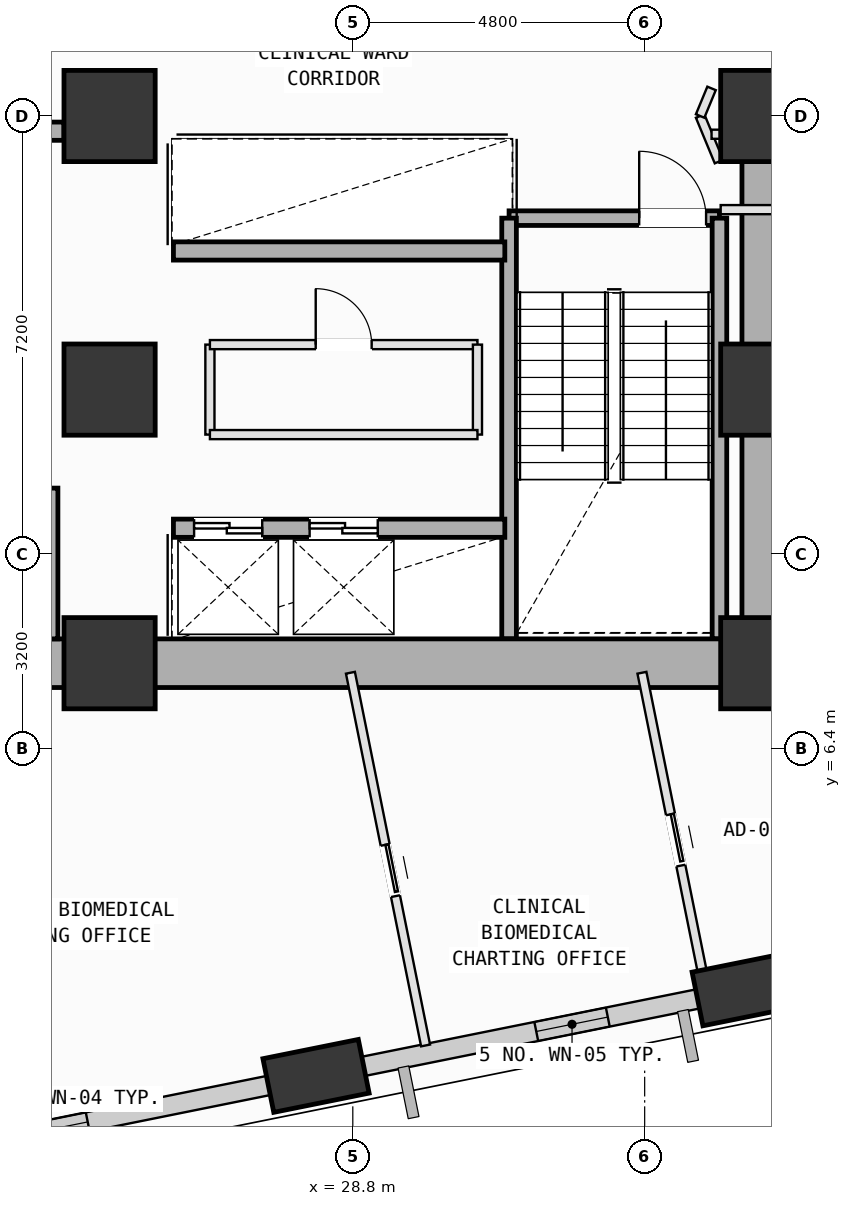
"""IFC4 building model, lengths in metres.
Left out: names, types, materials, properties, quantities, classifications, styles, units other than length and angle.
Written with IfcOpenShell. Run it as: python <this file> out.ifc"""

import sys

from ifc_helpers import new_model, si_unit, direction, frame, frame_2d, origin, origin_2d, place, context, subcontext, project, spatial, rectangle, extrude, element, fill, save


model = new_model("IFC4")
c1 = context("Model", 3, precision=1e-05, world=origin(), true_north=direction((0.0, 1.0)))
c2 = subcontext(c1, "Body", "Model", "MODEL_VIEW")
j1 = project(units=[si_unit("LENGTHUNIT", "METRE"), si_unit("PLANEANGLEUNIT", "RADIAN")], contexts=[c1])
p1 = place(None, origin())
s1 = spatial("IfcSite", under=j1, at=p1, CompositionType="ELEMENT")
p2 = place(p1, origin())
s2 = spatial("IfcBuilding", under=s1, at=p2, CompositionType="ELEMENT")
p3 = place(p2, frame((0.0, 0.0, 71.0)))
s3 = spatial("IfcBuildingStorey", under=s2, at=p3, CompositionType="ELEMENT", Elevation=71.0)
for number, where, z_axis, x_axis in (
    (1, (24.8, 7.8, 0.0), (0.0, 0.0, 1.0), (1.0, 0.0, 0.0)),
    (2, (24.8, 12.3, 0.0), (0.0, 0.0, 1.0), (1.0, 0.0, 0.0)),
    (3, (24.8, 16.8, 0.0), (0.0, 0.0, 1.0), (1.0, 0.0, 0.0)),
    (4, (35.6, 7.8, 0.0), (0.0, 0.0, 1.0), (1.0, 0.0, 0.0)),
    (5, (35.6, 12.3, 0.0), (0.0, 0.0, 1.0), (1.0, 0.0, 0.0)),
    (6, (35.6, 16.8, 0.0), (0.0, 0.0, 1.0), (1.0, 0.0, 0.0)),
):
    element("IfcColumn", number, at=place(p3, frame(where, z_axis=z_axis, x_axis=x_axis)), inside=s3, PredefinedType="COLUMN", context=c2, shape_type="SweptSolid", body=[
        extrude(rectangle(XDim=1.5, YDim=1.5, at=origin_2d()), origin(), (0.0, 0.0, 1.0), 4.0),
    ])
p4 = place(p3, frame((28.195, 1.012, 0.002), z_axis=(0.098277099799, -0.021515209232, 0.994926483428), x_axis=(0.017535010044, 0.999648488455, 0.019885244574)))
e7 = element("IfcColumn", 7, at=p4, inside=s3, PredefinedType="COLUMN", context=c2, shape_type="SweptSolid", body=[
    extrude(rectangle(XDim=1.6, YDim=0.9, at=origin_2d()), origin(), (0.0, 0.0, 1.0), 4.017),
])
p5 = place(p3, frame((35.253, 2.436, 0.002), z_axis=(0.092271488704, 0.007603122009, 0.995704858333), x_axis=(-0.27664462741, 0.960798033947, 0.018299947803)))
e8 = element("IfcColumn", 8, at=p5, inside=s3, PredefinedType="COLUMN", context=c2, shape_type="SweptSolid", body=[
    extrude(rectangle(XDim=1.6, YDim=0.9, at=origin_2d()), origin(), (0.0, 0.0, 1.0), 4.014),
])
p6 = place(p3, frame((27.786, 0.93, 0.0), z_axis=(0.0, 0.0, 1.0), x_axis=(-0.980274615863, -0.197640272956, 0.0)))
e9 = element("IfcWall", 9, at=p6, inside=s3, PredefinedType="SOLIDWALL", context=c2, shape_type="SweptSolid", body=[
    extrude(rectangle(XDim=6.006, YDim=0.32, at=frame_2d((3.003, 0.0))), origin(), (0.0, 0.0, 1.0), 3.165),
])
p7 = place(p6, frame((3.413, 0.0, 0.75)))
e10 = element("IfcOpeningElement", 10, at=p7, cuts=e9, PredefinedType="OPENING", context=c2, shape_type="SweptSolid", body=[
    extrude(rectangle(XDim=1.8, YDim=2.05, at=frame_2d((0.9, 1.025))), frame((0.0, 0.17, 0.0), z_axis=(0.0, -1.0, 0.0), x_axis=(1.0, 0.0, 0.0)), (0.0, 0.0, 1.0), 0.34),
])
p8 = place(p3, frame((34.839, 2.352, 0.0), z_axis=(0.0, 0.0, 1.0), x_axis=(-0.980280090352, -0.197613118135, 0.0)))
e11 = element("IfcWall", 11, at=p8, inside=s3, PredefinedType="SOLIDWALL", context=c2, shape_type="SweptSolid", body=[
    extrude(rectangle(XDim=5.99, YDim=0.32, at=frame_2d((2.995, 0.0))), origin(), (0.0, 0.0, 1.0), 3.165),
])
p9 = place(p8, frame((1.882, 0.0, 0.75)))
e12 = element("IfcOpeningElement", 12, at=p9, cuts=e11, PredefinedType="OPENING", context=c2, shape_type="SweptSolid", body=[
    extrude(rectangle(XDim=1.2, YDim=1.75, at=frame_2d((0.6, 0.875))), frame((0.0, 0.17, 0.0), z_axis=(0.0, -1.0, 0.0), x_axis=(1.0, 0.0, 0.0)), (0.0, 0.0, 1.0), 0.34),
])
p10 = place(p3, frame((31.37, 15.12, 0.0), z_axis=(0.0, 0.0, 1.0), x_axis=(1.0, 0.0, 0.0)))
e13 = element("IfcWall", 13, at=p10, inside=s3, PredefinedType="SOLIDWALL", context=c2, shape_type="SweptSolid", body=[
    extrude(rectangle(XDim=3.46, YDim=0.24, at=frame_2d((1.73, 0.0))), origin(), (0.0, 0.0, 1.0), 3.78),
])
p11 = place(p10, frame((2.14, 0.0, 0.0)))
e14 = element("IfcOpeningElement", 14, at=p11, cuts=e13, PredefinedType="OPENING", context=c2, shape_type="SweptSolid", body=[
    extrude(rectangle(XDim=1.1, YDim=2.15, at=frame_2d((0.55, 1.075))), frame((0.0, 0.13, 0.0), z_axis=(0.0, -1.0, 0.0), x_axis=(1.0, 0.0, 0.0)), (0.0, 0.0, 1.0), 0.26),
])
for number, where, z_axis, x_axis in (
    (15, (34.83, 15.12, 0.0), (0.0, 0.0, 1.0), (0.0, -1.0, 0.0)),
    (16, (31.37, 8.2, 0.0), (0.0, 0.0, 1.0), (0.0, 1.0, 0.0)),
):
    element("IfcWall", number, at=place(p3, frame(where, z_axis=z_axis, x_axis=x_axis)), inside=s3, PredefinedType="SOLIDWALL", context=c2, shape_type="SweptSolid", body=[
        extrude(rectangle(XDim=6.92, YDim=0.24, at=frame_2d((3.46, 0.0))), origin(), (0.0, 0.0, 1.0), 3.78),
    ])
for number, where, z_axis, x_axis in (
    (17, (14.0, 7.8, 0.0), (0.0, 0.0, 1.0), (1.0, 0.0, 0.0)),
    (18, (24.8, 7.8, 0.0), (0.0, 0.0, 1.0), (1.0, 0.0, 0.0)),
):
    element("IfcWall", number, at=place(p3, frame(where, z_axis=z_axis, x_axis=x_axis)), inside=s3, PredefinedType="SHEAR", context=c2, shape_type="SweptSolid", body=[
        extrude(rectangle(XDim=10.8, YDim=0.8, at=frame_2d((5.4, 0.0))), origin(), (0.0, 0.0, 1.0), 3.78),
    ])
p12 = place(p3, frame((35.6, 7.8, 0.0), z_axis=(0.0, 0.0, 1.0), x_axis=(0.0, 1.0, 0.0)))
e19 = element("IfcWall", 19, at=p12, inside=s3, PredefinedType="SHEAR", context=c2, shape_type="SweptSolid", body=[
    extrude(rectangle(XDim=9.0, YDim=0.8, at=frame_2d((4.5, 0.0))), origin(), (0.0, 0.0, 1.0), 3.78),
])
p13 = place(p3, frame((19.85, 16.55, 0.0), z_axis=(0.0, 0.0, 1.0), x_axis=(1.0, 0.0, 0.0)))
e20 = element("IfcWall", 20, at=p13, inside=s3, PredefinedType="SOLIDWALL", context=c2, shape_type="SweptSolid", body=[
    extrude(rectangle(XDim=4.2, YDim=0.3, at=frame_2d((2.1, 0.0))), origin(), (0.0, 0.0, 1.0), 3.78),
])
p14 = place(p13, frame((0.475, 0.0, 0.0)))
e21 = element("IfcOpeningElement", 21, at=p14, cuts=e20, PredefinedType="OPENING", context=c2, shape_type="SweptSolid", body=[
    extrude(rectangle(XDim=1.25, YDim=2.18, at=frame_2d((0.625, 1.09))), frame((0.0, 0.16, 0.0), z_axis=(0.0, -1.0, 0.0), x_axis=(1.0, 0.0, 0.0)), (0.0, 0.0, 1.0), 0.32),
])
p15 = place(p13, frame((2.49, 0.0, 0.0)))
e22 = element("IfcOpeningElement", 22, at=p15, cuts=e20, PredefinedType="OPENING", context=c2, shape_type="SweptSolid", body=[
    extrude(rectangle(XDim=1.02, YDim=2.12, at=frame_2d((0.51, 1.06))), frame((0.0, 0.16, 0.0), z_axis=(0.0, -1.0, 0.0), x_axis=(1.0, 0.0, 0.0)), (0.0, 0.0, 1.0), 0.32),
])
p16 = place(p3, frame((23.8, 8.2, 0.0), z_axis=(0.0, 0.0, 1.0), x_axis=(0.0, 1.0, 0.0)))
e23 = element("IfcWall", 23, at=p16, inside=s3, PredefinedType="SOLIDWALL", context=c2, shape_type="SweptSolid", body=[
    extrude(rectangle(XDim=2.48, YDim=0.3, at=frame_2d((1.24, 0.0))), origin(), (0.0, 0.0, 1.0), 3.78),
])
p17 = place(p3, frame((25.85, 10.02, 0.0), z_axis=(0.0, 0.0, 1.0), x_axis=(1.0, 0.0, 0.0)))
e24 = element("IfcWall", 24, at=p17, inside=s3, PredefinedType="SOLIDWALL", context=c2, shape_type="SweptSolid", body=[
    extrude(rectangle(XDim=5.45, YDim=0.3, at=frame_2d((2.725, 0.0))), origin(), (0.0, 0.0, 1.0), 3.78),
])
p18 = place(p17, frame((0.34, 0.0, 0.0)))
e25 = element("IfcOpeningElement", 25, at=p18, cuts=e24, PredefinedType="OPENING", context=c2, shape_type="SweptSolid", body=[
    extrude(rectangle(XDim=1.12, YDim=2.15, at=frame_2d((0.56, 1.075))), frame((0.0, 0.16, 0.0), z_axis=(0.0, -1.0, 0.0), x_axis=(1.0, 0.0, 0.0)), (0.0, 0.0, 1.0), 0.32),
])
p19 = place(p17, frame((2.24, 0.0, 0.0)))
e26 = element("IfcOpeningElement", 26, at=p19, cuts=e24, PredefinedType="OPENING", context=c2, shape_type="SweptSolid", body=[
    extrude(rectangle(XDim=1.12, YDim=2.15, at=frame_2d((0.56, 1.075))), frame((0.0, 0.16, 0.0), z_axis=(0.0, -1.0, 0.0), x_axis=(1.0, 0.0, 0.0)), (0.0, 0.0, 1.0), 0.32),
])
p20 = place(p3, frame((25.85, 14.58, 0.0), z_axis=(0.0, 0.0, 1.0), x_axis=(1.0, 0.0, 0.0)))
e27 = element("IfcWall", 27, at=p20, inside=s3, PredefinedType="SOLIDWALL", context=c2, shape_type="SweptSolid", body=[
    extrude(rectangle(XDim=5.45, YDim=0.3, at=frame_2d((2.725, 0.0))), origin(), (0.0, 0.0, 1.0), 3.78),
])
p21 = place(p3, frame((26.45, 11.56, 0.0), z_axis=(0.0, 0.0, 1.0), x_axis=(0.0, 1.0, 0.0)))
e28 = element("IfcWall", 28, at=p21, inside=s3, PredefinedType="PARTITIONING", context=c2, shape_type="SweptSolid", body=[
    extrude(rectangle(XDim=1.48, YDim=0.15, at=frame_2d((0.74, 0.0))), origin(), (0.0, 0.0, 1.0), 3.78),
])
p22 = place(p3, frame((26.45, 13.04, 0.0), z_axis=(0.0, 0.0, 1.0), x_axis=(1.0, 0.0, 0.0)))
e29 = element("IfcWall", 29, at=p22, inside=s3, PredefinedType="PARTITIONING", context=c2, shape_type="SweptSolid", body=[
    extrude(rectangle(XDim=4.4, YDim=0.15, at=frame_2d((2.2, 0.0))), origin(), (0.0, 0.0, 1.0), 3.78),
])
p23 = place(p22, frame((1.74, 0.0, 0.0)))
e30 = element("IfcOpeningElement", 30, at=p23, cuts=e29, PredefinedType="OPENING", context=c2, shape_type="SweptSolid", body=[
    extrude(rectangle(XDim=0.92, YDim=2.1, at=frame_2d((0.46, 1.05))), frame((0.0, 0.085, 0.0), z_axis=(0.0, -1.0, 0.0), x_axis=(1.0, 0.0, 0.0)), (0.0, 0.0, 1.0), 0.17),
])
p24 = place(p3, frame((30.85, 13.04, 0.0), z_axis=(0.0, 0.0, 1.0), x_axis=(0.0, -1.0, 0.0)))
e31 = element("IfcWall", 31, at=p24, inside=s3, PredefinedType="PARTITIONING", context=c2, shape_type="SweptSolid", body=[
    extrude(rectangle(XDim=1.48, YDim=0.15, at=frame_2d((0.74, 0.0))), origin(), (0.0, 0.0, 1.0), 3.78),
])
p25 = place(p3, frame((30.85, 11.56, 0.0), z_axis=(0.0, 0.0, 1.0), x_axis=(-1.0, 0.0, 0.0)))
e32 = element("IfcWall", 32, at=p25, inside=s3, PredefinedType="PARTITIONING", context=c2, shape_type="SweptSolid", body=[
    extrude(rectangle(XDim=4.4, YDim=0.15, at=frame_2d((2.2, 0.0))), origin(), (0.0, 0.0, 1.0), 3.78),
])
p26 = place(p3, frame((29.013, 0.943, 0.0), z_axis=(0.0, 0.0, 1.0), x_axis=(-0.980283356785, -0.197596913968, 0.0)))
e33 = element("IfcWall", 33, at=p26, inside=s3, PredefinedType="PARTITIONING", context=c2, shape_type="SweptSolid", body=[
    extrude(rectangle(XDim=1.205, YDim=0.15, at=frame_2d((0.602, 0.0))), origin(), (0.0, 0.0, 1.0), 3.165),
])
p27 = place(p3, frame((28.761, 7.643, 0.0), z_axis=(0.0, 0.0, 1.0), x_axis=(0.197662499127, -0.980270134422, 0.0)))
e34 = element("IfcWall", 34, at=p27, inside=s3, PredefinedType="PARTITIONING", context=c2, shape_type="SweptSolid", body=[
    extrude(rectangle(XDim=6.253, YDim=0.15, at=frame_2d((3.127, 0.0))), origin(), (0.0, 0.0, 1.0), 3.78),
])
p28 = place(p27, frame((2.888, 0.0, 0.0)))
e35 = element("IfcOpeningElement", 35, at=p28, cuts=e34, PredefinedType="OPENING", context=c2, shape_type="SweptSolid", body=[
    extrude(rectangle(XDim=0.86, YDim=2.06, at=frame_2d((0.43, 1.03))), frame((0.0, 0.085, 0.0), z_axis=(0.0, -1.0, 0.0), x_axis=(1.0, 0.0, 0.0)), (0.0, 0.0, 1.0), 0.17),
])
p29 = place(p3, frame((33.555, 7.643, 0.0), z_axis=(0.0, 0.0, 1.0), x_axis=(0.197717476779, -0.980259047077, 0.0)))
e36 = element("IfcWall", 36, at=p29, inside=s3, PredefinedType="PARTITIONING", context=c2, shape_type="SweptSolid", body=[
    extrude(rectangle(XDim=5.306, YDim=0.15, at=frame_2d((2.653, 0.0))), origin(), (0.0, 0.0, 1.0), 3.78),
])
p30 = place(p29, frame((2.376, 0.0, 0.0)))
e37 = element("IfcOpeningElement", 37, at=p30, cuts=e36, PredefinedType="OPENING", context=c2, shape_type="SweptSolid", body=[
    extrude(rectangle(XDim=0.86, YDim=2.06, at=frame_2d((0.43, 1.03))), frame((0.0, 0.085, 0.0), z_axis=(0.0, -1.0, 0.0), x_axis=(1.0, 0.0, 0.0)), (0.0, 0.0, 1.0), 0.17),
])
p31 = place(p3, frame((36.15, 15.26, 0.0), z_axis=(0.0, 0.0, 1.0), x_axis=(-1.0, 0.0, 0.0)))
e38 = element("IfcWall", 38, at=p31, inside=s3, PredefinedType="PARTITIONING", context=c2, shape_type="SweptSolid", body=[
    extrude(rectangle(XDim=1.3, YDim=0.15, at=frame_2d((0.65, 0.0))), origin(), (0.0, 0.0, 1.0), 3.78),
])
p32 = place(p3, frame((34.822, 16.05, 0.0), z_axis=(0.0, 0.0, 1.0), x_axis=(-0.382050639738, 0.924141389981, 0.0)))
e39 = element("IfcWall", 39, at=p32, inside=s3, PredefinedType="PARTITIONING", context=c2, shape_type="SweptSolid", body=[
    extrude(rectangle(XDim=0.812, YDim=0.15, at=frame_2d((0.406, 0.0))), origin(), (0.0, 0.0, 1.0), 3.78),
])
p33 = place(p3, frame((34.512, 16.8, 0.0), z_axis=(0.0, 0.0, 1.0), x_axis=(0.382673670509, 0.923883575944, 0.0)))
e40 = element("IfcWall", 40, at=p33, inside=s3, PredefinedType="PARTITIONING", context=c2, shape_type="SweptSolid", body=[
    extrude(rectangle(XDim=0.491, YDim=0.15, at=frame_2d((0.246, 0.0))), origin(), (0.0, 0.0, 1.0), 3.78),
])
p34 = place(p3, frame((34.7, 16.5, 0.0), z_axis=(0.0, 0.0, 1.0), x_axis=(1.0, 0.0, 0.0)))
e41 = element("IfcWall", 41, at=p34, inside=s3, PredefinedType="PARTITIONING", context=c2, shape_type="SweptSolid", body=[
    extrude(rectangle(XDim=1.8, YDim=0.15, at=frame_2d((0.9, 0.0))), origin(), (0.0, 0.0, 1.0), 2.865),
])
p35 = place(p3, frame((36.075, 2.367, 0.0), z_axis=(0.0, 0.0, 1.0), x_axis=(-0.980137701234, -0.198318144961, 0.0)))
e42 = element("IfcWall", 42, at=p35, inside=s3, PredefinedType="PARTITIONING", context=c2, shape_type="SweptSolid", body=[
    extrude(rectangle(XDim=1.215, YDim=0.15, at=frame_2d((0.607, 0.0))), origin(), (0.0, 0.0, 1.0), 3.165),
])
p36 = place(p3, frame((35.6, 7.5, 0.0), z_axis=(0.0, 0.0, 1.0), x_axis=(1.0, 0.0, 0.0)))
e43 = element("IfcWall", 43, at=p36, inside=s3, PredefinedType="PARTITIONING", context=c2, shape_type="SweptSolid", body=[
    extrude(rectangle(XDim=0.55, YDim=0.15, at=frame_2d((0.275, 0.0))), origin(), (0.0, 0.0, 1.0), 3.78),
])
p37 = place(p7, origin())
e44 = element("IfcWindow", 44, at=p37, inside=s3, PartitioningType="SINGLE_PANEL", PredefinedType="WINDOW", context=c2, shape_type="SweptSolid", body=[
    extrude(rectangle(XDim=1.8, YDim=2.05, at=frame_2d((0.9, 1.025))), frame((0.0, 0.03, 0.0), z_axis=(0.0, -1.0, 0.0), x_axis=(1.0, 0.0, 0.0)), (0.0, 0.0, 1.0), 0.06),
])
fill(e10, e44)
p38 = place(p9, origin())
e45 = element("IfcWindow", 45, at=p38, inside=s3, PartitioningType="SINGLE_PANEL", PredefinedType="WINDOW", context=c2, shape_type="SweptSolid", body=[
    extrude(rectangle(XDim=1.2, YDim=1.75, at=frame_2d((0.6, 0.875))), frame((0.0, 0.03, 0.0), z_axis=(0.0, -1.0, 0.0), x_axis=(1.0, 0.0, 0.0)), (0.0, 0.0, 1.0), 0.06),
])
fill(e12, e45)
p39 = place(p11, origin())
e46 = element("IfcDoor", 46, at=p39, inside=s3, OperationType="SINGLE_SWING_LEFT", PredefinedType="DOOR", context=c2, shape_type="SweptSolid", body=[
    extrude(rectangle(XDim=1.1, YDim=2.15, at=frame_2d((0.55, 1.075))), frame((0.0, 0.025, 0.0), z_axis=(0.0, -1.0, 0.0), x_axis=(1.0, 0.0, 0.0)), (0.0, 0.0, 1.0), 0.05),
])
fill(e14, e46)
p40 = place(p18, origin())
e47 = element("IfcDoor", 47, at=p40, inside=s3, OperationType="DOUBLE_DOOR_SLIDING", PredefinedType="DOOR", context=c2, shape_type="SweptSolid", body=[
    extrude(rectangle(XDim=1.12, YDim=2.15, at=frame_2d((0.56, 1.075))), frame((0.0, 0.025, 0.0), z_axis=(0.0, -1.0, 0.0), x_axis=(1.0, 0.0, 0.0)), (0.0, 0.0, 1.0), 0.05),
])
fill(e25, e47)
p41 = place(p19, origin())
e48 = element("IfcDoor", 48, at=p41, inside=s3, OperationType="DOUBLE_DOOR_SLIDING", PredefinedType="DOOR", context=c2, shape_type="SweptSolid", body=[
    extrude(rectangle(XDim=1.12, YDim=2.15, at=frame_2d((0.56, 1.075))), frame((0.0, 0.025, 0.0), z_axis=(0.0, -1.0, 0.0), x_axis=(1.0, 0.0, 0.0)), (0.0, 0.0, 1.0), 0.05),
])
fill(e26, e48)
p42 = place(p23, origin())
e49 = element("IfcDoor", 49, at=p42, inside=s3, OperationType="SINGLE_SWING_LEFT", PredefinedType="DOOR", context=c2, shape_type="SweptSolid", body=[
    extrude(rectangle(XDim=0.92, YDim=2.1, at=frame_2d((0.46, 1.05))), frame((0.0, 0.025, 0.0), z_axis=(0.0, -1.0, 0.0), x_axis=(1.0, 0.0, 0.0)), (0.0, 0.0, 1.0), 0.05),
])
fill(e30, e49)
p43 = place(p30, origin())
e50 = element("IfcDoor", 50, at=p43, inside=s3, OperationType="SLIDING_TO_LEFT", PredefinedType="DOOR", context=c2, shape_type="SweptSolid", body=[
    extrude(rectangle(XDim=0.86, YDim=2.06, at=frame_2d((0.43, 1.03))), frame((0.0, 0.025, 0.0), z_axis=(0.0, -1.0, 0.0), x_axis=(1.0, 0.0, 0.0)), (0.0, 0.0, 1.0), 0.05),
])
fill(e37, e50)
p44 = place(p28, origin())
e51 = element("IfcDoor", 51, at=p44, inside=s3, OperationType="SLIDING_TO_LEFT", PredefinedType="DOOR", context=c2, shape_type="SweptSolid", body=[
    extrude(rectangle(XDim=0.86, YDim=2.06, at=frame_2d((0.43, 1.03))), frame((0.0, 0.025, 0.0), z_axis=(0.0, -1.0, 0.0), x_axis=(1.0, 0.0, 0.0)), (0.0, 0.0, 1.0), 0.05),
])
fill(e35, e51)
save(model, sys.argv[1])
